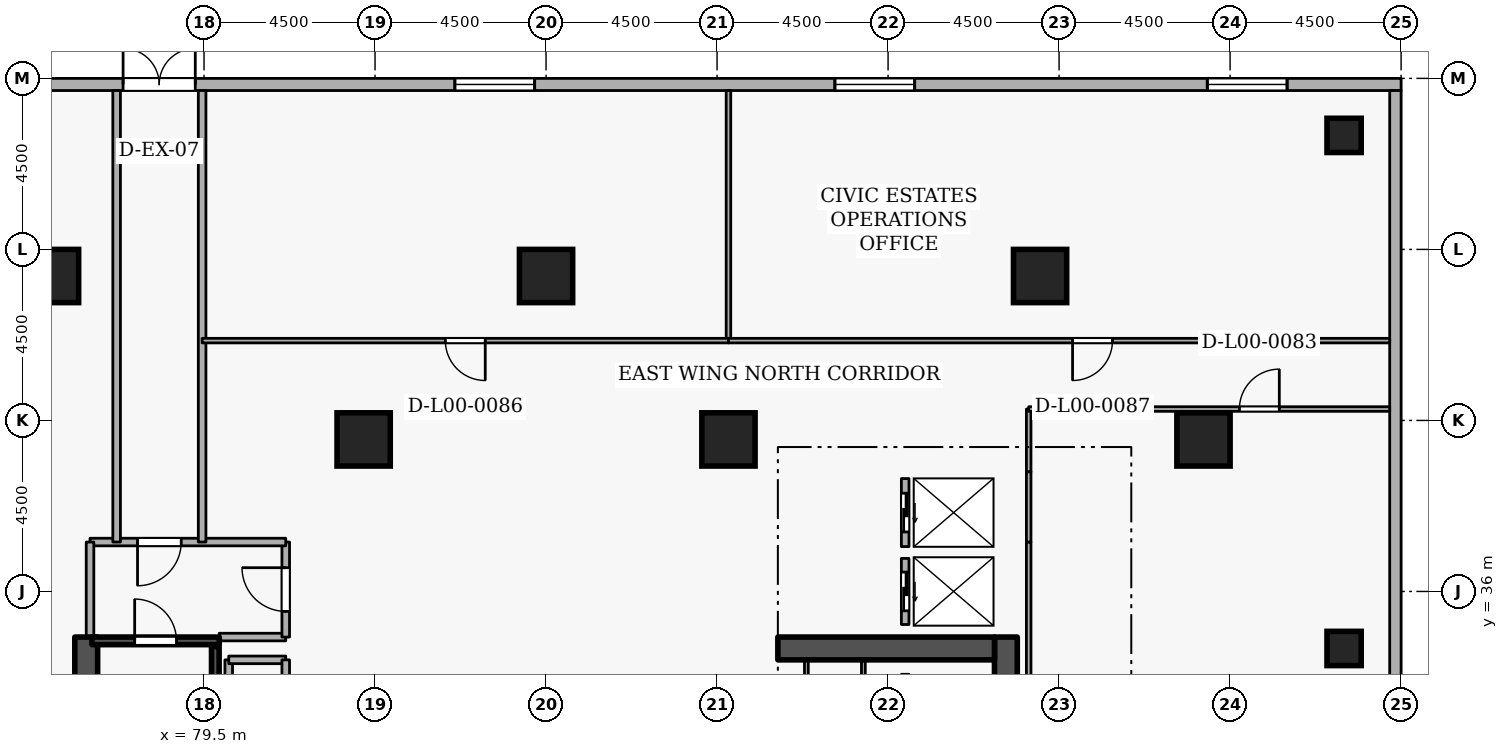
"""IFC4 building model, lengths in metres.
Left out: names, types, materials, properties, quantities, classifications, styles, units other than length and angle.
Written with IfcOpenShell. Run it as: python <this file> out.ifc"""

import sys

from ifc_helpers import new_model, si_unit, direction, frame, frame_2d, origin, origin_2d, place, context, subcontext, project, spatial, rectangle, extrude, element, fill, save


model = new_model("IFC4")
c1 = context("Model", 3, precision=1e-05, world=origin(), true_north=direction((0.0, 1.0)))
c2 = subcontext(c1, "Body", "Model", "MODEL_VIEW")
j1 = project(units=[si_unit("LENGTHUNIT", "METRE"), si_unit("PLANEANGLEUNIT", "RADIAN")], contexts=[c1])
p1 = place(None, origin())
s1 = spatial("IfcSite", under=j1, at=p1, CompositionType="ELEMENT")
p2 = place(p1, origin())
s2 = spatial("IfcBuilding", under=s1, at=p2, CompositionType="ELEMENT")
p3 = place(p2, origin())
s3 = spatial("IfcBuildingStorey", under=s2, at=p3, CompositionType="ELEMENT", Elevation=0.0)
p4 = place(p3, frame((100.6, 19.2, 0.0), z_axis=(0.0, 0.0, 1.0), x_axis=(0.0, 1.0, 0.0)))
e1 = element("IfcWall", 1, at=p4, inside=s3, PredefinedType="SHEAR", context=c2, shape_type="SweptSolid", body=[
    extrude(rectangle(XDim=15.6, YDim=0.6, at=frame_2d((7.8, 0.0))), origin(), (0.0, 0.0, 1.0), 4.8),
])
p5 = place(p3, frame((94.6, 34.5, 0.0), z_axis=(0.0, 0.0, 1.0), x_axis=(1.0, 0.0, 0.0)))
e2 = element("IfcWall", 2, at=p5, inside=s3, PredefinedType="SHEAR", context=c2, shape_type="SweptSolid", body=[
    extrude(rectangle(XDim=5.7, YDim=0.6, at=frame_2d((2.85, 0.0))), origin(), (0.0, 0.0, 1.0), 4.8),
])
p6 = place(p3, frame((76.4, 19.2, 0.0), z_axis=(0.0, 0.0, 1.0), x_axis=(0.0, 1.0, 0.0)))
e3 = element("IfcWall", 3, at=p6, inside=s3, PredefinedType="SHEAR", context=c2, shape_type="SweptSolid", body=[
    extrude(rectangle(XDim=15.6, YDim=0.6, at=frame_2d((7.8, 0.0))), origin(), (0.0, 0.0, 1.0), 4.8),
])
for number, where, z_axis, x_axis in (
    (4, (105.8, 40.0, 0.0), (0.0, 0.0, 1.0), (1.0, 0.0, 0.0)),
    (5, (101.5, 44.3, 0.0), (0.0, 0.0, 1.0), (1.0, 0.0, 0.0)),
    (6, (88.5, 44.3, 0.0), (0.0, 0.0, 1.0), (1.0, 0.0, 0.0)),
    (7, (75.5, 44.3, 0.0), (0.0, 0.0, 1.0), (1.0, 0.0, 0.0)),
    (8, (93.3, 40.0, 0.0), (0.0, 0.0, 1.0), (1.0, 0.0, 0.0)),
    (9, (83.7, 40.0, 0.0), (0.0, 0.0, 1.0), (1.0, 0.0, 0.0)),
):
    element("IfcColumn", number, at=place(p3, frame(where, z_axis=z_axis, x_axis=x_axis)), inside=s3, PredefinedType="COLUMN", context=c2, shape_type="SweptSolid", body=[
        extrude(rectangle(XDim=1.4, YDim=1.4, at=origin_2d()), origin(), (0.0, 0.0, 1.0), 4.8),
    ])
for number, where, z_axis, x_axis in (
    (10, (109.5, 34.5, 0.0), (0.0, 0.0, 1.0), (1.0, 0.0, 0.0)),
    (11, (109.5, 48.0, 0.0), (0.0, 0.0, 1.0), (1.0, 0.0, 0.0)),
):
    element("IfcColumn", number, at=place(p3, frame(where, z_axis=z_axis, x_axis=x_axis)), inside=s3, PredefinedType="COLUMN", context=c2, shape_type="SweptSolid", body=[
        extrude(rectangle(XDim=0.9, YDim=0.9, at=origin_2d()), origin(), (0.0, 0.0, 1.0), 4.8),
    ])
p7 = place(p3, frame((111.0, 49.34, 0.0), z_axis=(0.0, 0.0, 1.0), x_axis=(-1.0, 0.0, 0.0)))
e12 = element("IfcWall", 12, at=p7, inside=s3, PredefinedType="STANDARD", context=c2, shape_type="SweptSolid", body=[
    extrude(rectangle(XDim=39.4, YDim=0.32, at=frame_2d((19.7, 0.0))), origin(), (0.0, 0.0, 1.0), 3.86),
])
p8 = place(p7, frame((33.63, 0.0, 0.0), z_axis=(0.0, 0.0, 1.0), x_axis=(-1.0, 0.0, 0.0)))
e13 = element("IfcOpeningElement", 13, at=p8, cuts=e12, PredefinedType="OPENING", context=c2, shape_type="SweptSolid", body=[
    extrude(rectangle(XDim=1.9, YDim=2.25, at=frame_2d((0.95, 1.125))), frame((0.0, 0.17, 0.0), z_axis=(0.0, -1.0, 0.0), x_axis=(1.0, 0.0, 0.0)), (0.0, 0.0, 1.0), 0.34),
])
p9 = place(p7, frame((3.0, 0.0, 0.78)))
e14 = element("IfcOpeningElement", 14, at=p9, cuts=e12, PredefinedType="OPENING", context=c2, shape_type="SweptSolid", body=[
    extrude(rectangle(XDim=2.1, YDim=2.4, at=frame_2d((1.05, 1.2))), frame((0.0, 0.17, 0.0), z_axis=(0.0, -1.0, 0.0), x_axis=(1.0, 0.0, 0.0)), (0.0, 0.0, 1.0), 0.34),
])
p10 = place(p7, frame((12.8, 0.0, 0.78)))
e15 = element("IfcOpeningElement", 15, at=p10, cuts=e12, PredefinedType="OPENING", context=c2, shape_type="SweptSolid", body=[
    extrude(rectangle(XDim=2.1, YDim=2.4, at=frame_2d((1.05, 1.2))), frame((0.0, 0.17, 0.0), z_axis=(0.0, -1.0, 0.0), x_axis=(1.0, 0.0, 0.0)), (0.0, 0.0, 1.0), 0.34),
])
p11 = place(p7, frame((22.8, 0.0, 0.78)))
e16 = element("IfcOpeningElement", 16, at=p11, cuts=e12, PredefinedType="OPENING", context=c2, shape_type="SweptSolid", body=[
    extrude(rectangle(XDim=2.1, YDim=2.4, at=frame_2d((1.05, 1.2))), frame((0.0, 0.17, 0.0), z_axis=(0.0, -1.0, 0.0), x_axis=(1.0, 0.0, 0.0)), (0.0, 0.0, 1.0), 0.34),
])
p12 = place(p3, frame((110.85, 4.82, 0.0), z_axis=(0.0, 0.0, 1.0), x_axis=(0.0, 1.0, 0.0)))
e17 = element("IfcWall", 17, at=p12, inside=s3, PredefinedType="STANDARD", context=c2, shape_type="SweptSolid", body=[
    extrude(rectangle(XDim=44.36, YDim=0.3, at=frame_2d((22.18, 0.0))), origin(), (0.0, 0.0, 1.0), 3.86),
])
p13 = place(p12, frame((22.9, 0.0, 0.0), z_axis=(0.0, 0.0, 1.0), x_axis=(-1.0, 0.0, 0.0)))
e18 = element("IfcOpeningElement", 18, at=p13, cuts=e17, PredefinedType="OPENING", context=c2, shape_type="SweptSolid", body=[
    extrude(rectangle(XDim=1.9, YDim=2.25, at=frame_2d((0.95, 1.125))), frame((0.0, 0.16, 0.0), z_axis=(0.0, -1.0, 0.0), x_axis=(1.0, 0.0, 0.0)), (0.0, 0.0, 1.0), 0.32),
])
p14 = place(p3, frame((97.95, 33.82, 0.0), z_axis=(0.0, 0.0, 1.0), x_axis=(0.0, -1.0, 0.0)))
e19 = element("IfcWall", 19, at=p14, inside=s3, PredefinedType="STANDARD", context=c2, shape_type="SweptSolid", body=[
    extrude(rectangle(XDim=1.89, YDim=0.2, at=frame_2d((0.945, 0.0))), origin(), (0.0, 0.0, 1.0), 4.46),
])
p15 = place(p14, frame((0.435, 0.0, 0.0)))
e20 = element("IfcOpeningElement", 20, at=p15, cuts=e19, PredefinedType="OPENING", context=c2, shape_type="SweptSolid", body=[
    extrude(rectangle(XDim=1.02, YDim=2.06, at=frame_2d((0.51, 1.03))), frame((0.0, 0.11, 0.0), z_axis=(0.0, -1.0, 0.0), x_axis=(1.0, 0.0, 0.0)), (0.0, 0.0, 1.0), 0.22),
])
p16 = place(p3, frame((97.95, 36.87, 0.0), z_axis=(0.0, 0.0, 1.0), x_axis=(0.0, -1.0, 0.0)))
e21 = element("IfcWall", 21, at=p16, inside=s3, PredefinedType="STANDARD", context=c2, shape_type="SweptSolid", body=[
    extrude(rectangle(XDim=1.74, YDim=0.2, at=frame_2d((0.87, 0.0))), origin(), (0.0, 0.0, 1.0), 4.46),
])
p17 = place(p16, frame((0.36, 0.0, 0.0)))
e22 = element("IfcOpeningElement", 22, at=p17, cuts=e21, PredefinedType="OPENING", context=c2, shape_type="SweptSolid", body=[
    extrude(rectangle(XDim=1.02, YDim=2.06, at=frame_2d((0.51, 1.03))), frame((0.0, 0.11, 0.0), z_axis=(0.0, -1.0, 0.0), x_axis=(1.0, 0.0, 0.0)), (0.0, 0.0, 1.0), 0.22),
])
p18 = place(p3, frame((97.95, 38.97, 0.0), z_axis=(0.0, 0.0, 1.0), x_axis=(0.0, -1.0, 0.0)))
e23 = element("IfcWall", 23, at=p18, inside=s3, PredefinedType="STANDARD", context=c2, shape_type="SweptSolid", body=[
    extrude(rectangle(XDim=1.79, YDim=0.2, at=frame_2d((0.895, 0.0))), origin(), (0.0, 0.0, 1.0), 4.46),
])
p19 = place(p18, frame((0.385, 0.0, 0.0)))
e24 = element("IfcOpeningElement", 24, at=p19, cuts=e23, PredefinedType="OPENING", context=c2, shape_type="SweptSolid", body=[
    extrude(rectangle(XDim=1.02, YDim=2.06, at=frame_2d((0.51, 1.03))), frame((0.0, 0.11, 0.0), z_axis=(0.0, -1.0, 0.0), x_axis=(1.0, 0.0, 0.0)), (0.0, 0.0, 1.0), 0.22),
])
p20 = place(p3, frame((76.55, 34.7, 0.0), z_axis=(0.0, 0.0, 1.0), x_axis=(1.0, 0.0, 0.0)))
e25 = element("IfcWall", 25, at=p20, inside=s3, PredefinedType="SHEAR", context=c2, shape_type="SweptSolid", body=[
    extrude(rectangle(XDim=3.35, YDim=0.2, at=frame_2d((1.675, 0.0))), origin(), (0.0, 0.0, 1.0), 4.8),
])
p21 = place(p20, frame((1.125, 0.0, 0.0)))
e26 = element("IfcOpeningElement", 26, at=p21, cuts=e25, PredefinedType="OPENING", context=c2, shape_type="SweptSolid", body=[
    extrude(rectangle(XDim=1.1, YDim=2.1, at=frame_2d((0.55, 1.05))), frame((0.0, 0.11, 0.0), z_axis=(0.0, -1.0, 0.0), x_axis=(1.0, 0.0, 0.0)), (0.0, 0.0, 1.0), 0.22),
])
p22 = place(p3, frame((79.797, 27.45, 0.0), z_axis=(0.0, 0.0, 1.0), x_axis=(0.0, 1.0, 0.0)))
e27 = element("IfcWall", 27, at=p22, inside=s3, PredefinedType="SHEAR", context=c2, shape_type="SweptSolid", body=[
    extrude(rectangle(XDim=7.1, YDim=0.2, at=frame_2d((3.55, 0.0))), origin(), (0.0, 0.0, 1.0), 4.8),
])
p23 = place(p3, frame((79.9, 34.8, 0.0), z_axis=(0.0, 0.0, 1.0), x_axis=(1.0, 0.0, 0.0)))
e28 = element("IfcWall", 28, at=p23, inside=s3, PredefinedType="STANDARD", context=c2, shape_type="SweptSolid", body=[
    extrude(rectangle(XDim=1.75, YDim=0.2, at=frame_2d((0.875, 0.0))), origin(), (0.0, 0.0, 1.0), 3.665),
])
p24 = place(p3, frame((81.65, 34.8, 0.0), z_axis=(0.0, 0.0, 1.0), x_axis=(0.0, 1.0, 0.0)))
e29 = element("IfcWall", 29, at=p24, inside=s3, PredefinedType="STANDARD", context=c2, shape_type="SweptSolid", body=[
    extrude(rectangle(XDim=2.5, YDim=0.2, at=frame_2d((1.25, 0.0))), origin(), (0.0, 0.0, 1.0), 4.46),
])
p25 = place(p24, frame((0.675, 0.0, 0.0)))
e30 = element("IfcOpeningElement", 30, at=p25, cuts=e29, PredefinedType="OPENING", context=c2, shape_type="SweptSolid", body=[
    extrude(rectangle(XDim=1.15, YDim=2.1, at=frame_2d((0.575, 1.05))), frame((0.0, 0.11, 0.0), z_axis=(0.0, -1.0, 0.0), x_axis=(1.0, 0.0, 0.0)), (0.0, 0.0, 1.0), 0.22),
])
p26 = place(p3, frame((81.65, 37.3, 0.0), z_axis=(0.0, 0.0, 1.0), x_axis=(-1.0, 0.0, 0.0)))
e31 = element("IfcWall", 31, at=p26, inside=s3, PredefinedType="STANDARD", context=c2, shape_type="SweptSolid", body=[
    extrude(rectangle(XDim=5.15, YDim=0.2, at=frame_2d((2.575, 0.0))), origin(), (0.0, 0.0, 1.0), 4.46),
])
p27 = place(p26, frame((2.75, 0.0, 0.0)))
e32 = element("IfcOpeningElement", 32, at=p27, cuts=e31, PredefinedType="OPENING", context=c2, shape_type="SweptSolid", body=[
    extrude(rectangle(XDim=1.15, YDim=2.1, at=frame_2d((0.575, 1.05))), frame((0.0, 0.11, 0.0), z_axis=(0.0, -1.0, 0.0), x_axis=(1.0, 0.0, 0.0)), (0.0, 0.0, 1.0), 0.22),
])
p28 = place(p3, frame((76.5, 37.3, 0.0), z_axis=(0.0, 0.0, 1.0), x_axis=(0.0, -1.0, 0.0)))
e33 = element("IfcWall", 33, at=p28, inside=s3, PredefinedType="STANDARD", context=c2, shape_type="SweptSolid", body=[
    extrude(rectangle(XDim=2.5, YDim=0.2, at=frame_2d((1.25, 0.0))), origin(), (0.0, 0.0, 1.0), 4.46),
])
p29 = place(p3, frame((80.15, 31.85, 0.0), z_axis=(0.0, 0.0, 1.0), x_axis=(0.0, 1.0, 0.0)))
e34 = element("IfcWall", 34, at=p29, inside=s3, PredefinedType="STANDARD", context=c2, shape_type="SweptSolid", body=[
    extrude(rectangle(XDim=2.35, YDim=0.2, at=frame_2d((1.175, 0.0))), origin(), (0.0, 0.0, 1.0), 4.46),
])
p30 = place(p3, frame((80.15, 34.2, 0.0), z_axis=(0.0, 0.0, 1.0), x_axis=(1.0, 0.0, 0.0)))
e35 = element("IfcWall", 35, at=p30, inside=s3, PredefinedType="STANDARD", context=c2, shape_type="SweptSolid", body=[
    extrude(rectangle(XDim=1.5, YDim=0.2, at=frame_2d((0.75, 0.0))), origin(), (0.0, 0.0, 1.0), 3.665),
])
p31 = place(p3, frame((81.65, 34.2, 0.0), z_axis=(0.0, 0.0, 1.0), x_axis=(0.0, -1.0, 0.0)))
e36 = element("IfcWall", 36, at=p31, inside=s3, PredefinedType="STANDARD", context=c2, shape_type="SweptSolid", body=[
    extrude(rectangle(XDim=2.35, YDim=0.2, at=frame_2d((1.175, 0.0))), origin(), (0.0, 0.0, 1.0), 4.46),
])
p32 = place(p31, frame((0.6, 0.0, 0.0)))
e37 = element("IfcOpeningElement", 37, at=p32, cuts=e36, PredefinedType="OPENING", context=c2, shape_type="SweptSolid", body=[
    extrude(rectangle(XDim=1.15, YDim=2.1, at=frame_2d((0.575, 1.05))), frame((0.0, 0.11, 0.0), z_axis=(0.0, -1.0, 0.0), x_axis=(1.0, 0.0, 0.0)), (0.0, 0.0, 1.0), 0.22),
])
for number, where, z_axis, x_axis in (
    (38, (77.2, 37.3, 0.0), (0.0, 0.0, 1.0), (0.0, 1.0, 0.0)),
    (39, (79.45, 49.18, 0.0), (0.0, 0.0, 1.0), (0.0, -1.0, 0.0)),
):
    element("IfcWall", number, at=place(p3, frame(where, z_axis=z_axis, x_axis=x_axis)), inside=s3, PredefinedType="STANDARD", context=c2, shape_type="SweptSolid", body=[
        extrude(rectangle(XDim=11.88, YDim=0.2, at=frame_2d((5.94, 0.0))), origin(), (0.0, 0.0, 1.0), 4.46),
    ])
p33 = place(p3, frame((95.35, 32.05, 0.0), z_axis=(0.0, 0.0, 1.0), x_axis=(0.0, 1.0, 0.0)))
e40 = element("IfcWall", 40, at=p33, inside=s3, PredefinedType="PARTITIONING", context=c2, shape_type="SweptSolid", body=[
    extrude(rectangle(XDim=2.15, YDim=0.1, at=frame_2d((1.075, 0.0))), origin(), (0.0, 0.0, 1.0), 4.46),
])
p34 = place(p33, frame((0.6, 0.0, 0.0)))
e41 = element("IfcOpeningElement", 41, at=p34, cuts=e40, PredefinedType="OPENING", context=c2, shape_type="SweptSolid", body=[
    extrude(rectangle(XDim=0.95, YDim=2.1, at=frame_2d((0.475, 1.05))), frame((0.0, 0.06, 0.0), z_axis=(0.0, -1.0, 0.0), x_axis=(1.0, 0.0, 0.0)), (0.0, 0.0, 1.0), 0.12),
])
p35 = place(p3, frame((96.85, 34.2, 0.0), z_axis=(0.0, 0.0, 1.0), x_axis=(0.0, -1.0, 0.0)))
e42 = element("IfcWall", 42, at=p35, inside=s3, PredefinedType="PARTITIONING", context=c2, shape_type="SweptSolid", body=[
    extrude(rectangle(XDim=2.15, YDim=0.1, at=frame_2d((1.075, 0.0))), origin(), (0.0, 0.0, 1.0), 4.46),
])
p36 = place(p3, frame((101.2, 16.65, 0.0), z_axis=(0.0, 0.0, 1.0), x_axis=(0.0, 1.0, 0.0)))
e43 = element("IfcWall", 43, at=p36, inside=s3, PredefinedType="PARTITIONING", context=c2, shape_type="SweptSolid", body=[
    extrude(rectangle(XDim=20.65, YDim=0.12, at=frame_2d((10.325, 0.0))), origin(), (0.0, 0.0, 1.0), 4.46),
])
p37 = place(p3, frame((101.2, 37.3, 0.0), z_axis=(0.0, 0.0, 1.0), x_axis=(0.0, 1.0, 0.0)))
e44 = element("IfcWall", 44, at=p37, inside=s3, PredefinedType="PARTITIONING", context=c2, shape_type="SweptSolid", body=[
    extrude(rectangle(XDim=1.85, YDim=0.12, at=frame_2d((0.925, 0.0))), origin(), (0.0, 0.0, 1.0), 4.46),
])
p38 = place(p3, frame((101.2, 39.15, 0.0), z_axis=(0.0, 0.0, 1.0), x_axis=(0.0, 1.0, 0.0)))
e45 = element("IfcWall", 45, at=p38, inside=s3, PredefinedType="PARTITIONING", context=c2, shape_type="SweptSolid", body=[
    extrude(rectangle(XDim=1.65, YDim=0.12, at=frame_2d((0.825, 0.0))), origin(), (0.0, 0.0, 1.0), 4.46),
])
p39 = place(p3, frame((101.2, 40.8, 0.0), z_axis=(0.0, 0.0, 1.0), x_axis=(1.0, 0.0, 0.0)))
e46 = element("IfcWall", 46, at=p39, inside=s3, PredefinedType="PARTITIONING", context=c2, shape_type="SweptSolid", body=[
    extrude(rectangle(XDim=9.5, YDim=0.12, at=frame_2d((4.75, 0.0))), origin(), (0.0, 0.0, 1.0), 4.46),
])
p40 = place(p39, frame((5.545, 0.0, 0.0)))
e47 = element("IfcOpeningElement", 47, at=p40, cuts=e46, PredefinedType="OPENING", context=c2, shape_type="SweptSolid", body=[
    extrude(rectangle(XDim=1.05, YDim=2.1, at=frame_2d((0.525, 1.05))), frame((0.0, 0.07, 0.0), z_axis=(0.0, -1.0, 0.0), x_axis=(1.0, 0.0, 0.0)), (0.0, 0.0, 1.0), 0.14),
])
p41 = place(p3, frame((93.3, 49.18, 0.0), z_axis=(0.0, 0.0, 1.0), x_axis=(0.0, -1.0, 0.0)))
e48 = element("IfcWall", 48, at=p41, inside=s3, PredefinedType="PARTITIONING", context=c2, shape_type="SweptSolid", body=[
    extrude(rectangle(XDim=6.58, YDim=0.12, at=frame_2d((3.29, 0.0))), origin(), (0.0, 0.0, 1.0), 4.46),
])
p42 = place(p3, frame((93.3, 42.6, 0.0), z_axis=(0.0, 0.0, 1.0), x_axis=(-1.0, 0.0, 0.0)))
e49 = element("IfcWall", 49, at=p42, inside=s3, PredefinedType="PARTITIONING", context=c2, shape_type="SweptSolid", body=[
    extrude(rectangle(XDim=13.85, YDim=0.12, at=frame_2d((6.925, 0.0))), origin(), (0.0, 0.0, 1.0), 4.46),
])
p43 = place(p42, frame((6.4, 0.0, 0.0)))
e50 = element("IfcOpeningElement", 50, at=p43, cuts=e49, PredefinedType="OPENING", context=c2, shape_type="SweptSolid", body=[
    extrude(rectangle(XDim=1.05, YDim=2.1, at=frame_2d((0.525, 1.05))), frame((0.0, 0.07, 0.0), z_axis=(0.0, -1.0, 0.0), x_axis=(1.0, 0.0, 0.0)), (0.0, 0.0, 1.0), 0.14),
])
p44 = place(p3, frame((110.7, 42.6, 0.0), z_axis=(0.0, 0.0, 1.0), x_axis=(-1.0, 0.0, 0.0)))
e51 = element("IfcWall", 51, at=p44, inside=s3, PredefinedType="PARTITIONING", context=c2, shape_type="SweptSolid", body=[
    extrude(rectangle(XDim=17.4, YDim=0.12, at=frame_2d((8.7, 0.0))), origin(), (0.0, 0.0, 1.0), 4.46),
])
p45 = place(p44, frame((7.295, 0.0, 0.0)))
e52 = element("IfcOpeningElement", 52, at=p45, cuts=e51, PredefinedType="OPENING", context=c2, shape_type="SweptSolid", body=[
    extrude(rectangle(XDim=1.05, YDim=2.1, at=frame_2d((0.525, 1.05))), frame((0.0, 0.07, 0.0), z_axis=(0.0, -1.0, 0.0), x_axis=(1.0, 0.0, 0.0)), (0.0, 0.0, 1.0), 0.14),
])
p46 = place(p8, origin())
e53 = element("IfcDoor", 53, at=p46, inside=s3, OperationType="DOUBLE_DOOR_SINGLE_SWING", PredefinedType="DOOR", context=c2, shape_type="SweptSolid", body=[
    extrude(rectangle(XDim=1.9, YDim=2.25, at=frame_2d((0.95, 1.125))), frame((0.0, 0.025, 0.0), z_axis=(0.0, -1.0, 0.0), x_axis=(1.0, 0.0, 0.0)), (0.0, 0.0, 1.0), 0.05),
])
fill(e13, e53)
p47 = place(p9, origin())
e54 = element("IfcWindow", 54, at=p47, inside=s3, PartitioningType="SINGLE_PANEL", PredefinedType="WINDOW", context=c2, shape_type="SweptSolid", body=[
    extrude(rectangle(XDim=2.1, YDim=2.4, at=frame_2d((1.05, 1.2))), frame((0.0, 0.03, 0.0), z_axis=(0.0, -1.0, 0.0), x_axis=(1.0, 0.0, 0.0)), (0.0, 0.0, 1.0), 0.06),
])
fill(e14, e54)
p48 = place(p10, origin())
e55 = element("IfcWindow", 55, at=p48, inside=s3, PartitioningType="SINGLE_PANEL", PredefinedType="WINDOW", context=c2, shape_type="SweptSolid", body=[
    extrude(rectangle(XDim=2.1, YDim=2.4, at=frame_2d((1.05, 1.2))), frame((0.0, 0.03, 0.0), z_axis=(0.0, -1.0, 0.0), x_axis=(1.0, 0.0, 0.0)), (0.0, 0.0, 1.0), 0.06),
])
fill(e15, e55)
p49 = place(p11, origin())
e56 = element("IfcWindow", 56, at=p49, inside=s3, PartitioningType="SINGLE_PANEL", PredefinedType="WINDOW", context=c2, shape_type="SweptSolid", body=[
    extrude(rectangle(XDim=2.1, YDim=2.4, at=frame_2d((1.05, 1.2))), frame((0.0, 0.03, 0.0), z_axis=(0.0, -1.0, 0.0), x_axis=(1.0, 0.0, 0.0)), (0.0, 0.0, 1.0), 0.06),
])
fill(e16, e56)
p50 = place(p17, origin())
e57 = element("IfcDoor", 57, at=p50, inside=s3, OperationType="SLIDING_TO_LEFT", PredefinedType="DOOR", context=c2, shape_type="SweptSolid", body=[
    extrude(rectangle(XDim=1.02, YDim=2.06, at=frame_2d((0.51, 1.03))), frame((0.0, 0.025, 0.0), z_axis=(0.0, -1.0, 0.0), x_axis=(1.0, 0.0, 0.0)), (0.0, 0.0, 1.0), 0.05),
])
fill(e22, e57)
p51 = place(p19, origin())
e58 = element("IfcDoor", 58, at=p51, inside=s3, OperationType="SLIDING_TO_LEFT", PredefinedType="DOOR", context=c2, shape_type="SweptSolid", body=[
    extrude(rectangle(XDim=1.02, YDim=2.06, at=frame_2d((0.51, 1.03))), frame((0.0, 0.025, 0.0), z_axis=(0.0, -1.0, 0.0), x_axis=(1.0, 0.0, 0.0)), (0.0, 0.0, 1.0), 0.05),
])
fill(e24, e58)
p52 = place(p21, origin())
e59 = element("IfcDoor", 59, at=p52, inside=s3, OperationType="SINGLE_SWING_LEFT", PredefinedType="DOOR", context=c2, shape_type="SweptSolid", body=[
    extrude(rectangle(XDim=1.1, YDim=2.1, at=frame_2d((0.55, 1.05))), frame((0.0, 0.025, 0.0), z_axis=(0.0, -1.0, 0.0), x_axis=(1.0, 0.0, 0.0)), (0.0, 0.0, 1.0), 0.05),
])
fill(e26, e59)
p53 = place(p25, origin())
e60 = element("IfcDoor", 60, at=p53, inside=s3, OperationType="SINGLE_SWING_RIGHT", PredefinedType="DOOR", context=c2, shape_type="SweptSolid", body=[
    extrude(rectangle(XDim=1.15, YDim=2.1, at=frame_2d((0.575, 1.05))), frame((0.0, 0.025, 0.0), z_axis=(0.0, -1.0, 0.0), x_axis=(1.0, 0.0, 0.0)), (0.0, 0.0, 1.0), 0.05),
])
fill(e30, e60)
p54 = place(p27, origin())
e61 = element("IfcDoor", 61, at=p54, inside=s3, OperationType="SINGLE_SWING_RIGHT", PredefinedType="DOOR", context=c2, shape_type="SweptSolid", body=[
    extrude(rectangle(XDim=1.15, YDim=2.1, at=frame_2d((0.575, 1.05))), frame((0.0, 0.025, 0.0), z_axis=(0.0, -1.0, 0.0), x_axis=(1.0, 0.0, 0.0)), (0.0, 0.0, 1.0), 0.05),
])
fill(e32, e61)
p55 = place(p40, origin())
e62 = element("IfcDoor", 62, at=p55, inside=s3, OperationType="SINGLE_SWING_RIGHT", PredefinedType="DOOR", context=c2, shape_type="SweptSolid", body=[
    extrude(rectangle(XDim=1.05, YDim=2.1, at=frame_2d((0.525, 1.05))), frame((0.0, 0.025, 0.0), z_axis=(0.0, -1.0, 0.0), x_axis=(1.0, 0.0, 0.0)), (0.0, 0.0, 1.0), 0.05),
])
fill(e47, e62)
p56 = place(p43, origin())
e63 = element("IfcDoor", 63, at=p56, inside=s3, OperationType="SINGLE_SWING_LEFT", PredefinedType="DOOR", context=c2, shape_type="SweptSolid", body=[
    extrude(rectangle(XDim=1.05, YDim=2.1, at=frame_2d((0.525, 1.05))), frame((0.0, 0.025, 0.0), z_axis=(0.0, -1.0, 0.0), x_axis=(1.0, 0.0, 0.0)), (0.0, 0.0, 1.0), 0.05),
])
fill(e50, e63)
p57 = place(p45, origin())
e64 = element("IfcDoor", 64, at=p57, inside=s3, OperationType="SINGLE_SWING_RIGHT", PredefinedType="DOOR", context=c2, shape_type="SweptSolid", body=[
    extrude(rectangle(XDim=1.05, YDim=2.1, at=frame_2d((0.525, 1.05))), frame((0.0, 0.025, 0.0), z_axis=(0.0, -1.0, 0.0), x_axis=(1.0, 0.0, 0.0)), (0.0, 0.0, 1.0), 0.05),
])
fill(e52, e64)
save(model, sys.argv[1])
